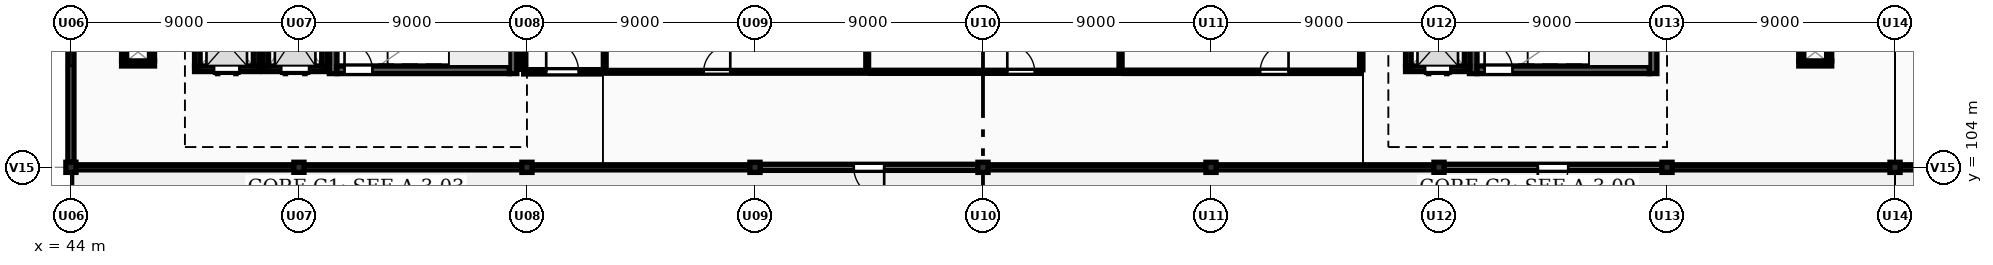
"""IFC4 building model, lengths in metres.
Left out: names, types, materials, properties, quantities, classifications, styles, units other than length and angle.
Written with IfcOpenShell. Run it as: python <this file> out.ifc"""

import sys

from ifc_helpers import new_model, si_unit, direction, frame, frame_2d, origin, origin_2d, place, context, subcontext, project, spatial, rectangle, extrude, element, fill, save


model = new_model("IFC4")
c1 = context("Model", 3, precision=1e-05, world=origin(), true_north=direction((0.0, 1.0)))
c2 = subcontext(c1, "Body", "Model", "MODEL_VIEW")
j1 = project(units=[si_unit("LENGTHUNIT", "METRE"), si_unit("PLANEANGLEUNIT", "RADIAN")], contexts=[c1])
p1 = place(None, origin())
s1 = spatial("IfcSite", under=j1, at=p1, CompositionType="ELEMENT")
p2 = place(p1, origin())
s2 = spatial("IfcBuilding", under=s1, at=p2, CompositionType="ELEMENT")
p3 = place(p2, frame((0.0, 0.0, 8.4)))
s3 = spatial("IfcBuildingStorey", under=s2, at=p3, CompositionType="ELEMENT", Elevation=8.4)
for number, where, z_axis, x_axis in (
    (1, (44.0, 104.0, 0.0), (0.0, 0.0, 1.0), (1.0, 0.0, 0.0)),
    (2, (53.0, 104.0, 0.0), (0.0, 0.0, 1.0), (1.0, 0.0, 0.0)),
    (3, (62.0, 104.0, 0.0), (0.0, 0.0, 1.0), (1.0, 0.0, 0.0)),
    (4, (71.0, 104.0, 0.0), (0.0, 0.0, 1.0), (1.0, 0.0, 0.0)),
    (5, (80.0, 104.0, 0.0), (0.0, 0.0, 1.0), (1.0, 0.0, 0.0)),
    (6, (89.0, 104.0, 0.0), (0.0, 0.0, 1.0), (1.0, 0.0, 0.0)),
    (7, (98.0, 104.0, 0.0), (0.0, 0.0, 1.0), (1.0, 0.0, 0.0)),
    (8, (107.0, 104.0, 0.0), (0.0, 0.0, 1.0), (1.0, 0.0, 0.0)),
    (9, (116.0, 104.0, 0.0), (0.0, 0.0, 1.0), (1.0, 0.0, 0.0)),
):
    element("IfcColumn", number, at=place(p3, frame(where, z_axis=z_axis, x_axis=x_axis)), inside=s3, PredefinedType="COLUMN", context=c2, shape_type="SweptSolid", body=[
        extrude(rectangle(XDim=0.4, YDim=0.4, at=origin_2d()), origin(), (0.0, 0.0, 1.0), 3.9),
    ])
p4 = place(p3, frame((115.8, 104.0, 0.0), z_axis=(0.0, 0.0, 1.0), x_axis=(-1.0, 0.0, 0.0)))
e10 = element("IfcWall", 10, at=p4, inside=s3, PredefinedType="SOLIDWALL", context=c2, shape_type="SweptSolid", body=[
    extrude(rectangle(XDim=8.6, YDim=0.2, at=frame_2d((4.3, 0.0))), origin(), (0.0, 0.0, 1.0), 0.95),
])
p5 = place(p3, frame((106.8, 104.0, 0.0), z_axis=(0.0, 0.0, 1.0), x_axis=(-1.0, 0.0, 0.0)))
e11 = element("IfcWall", 11, at=p5, inside=s3, PredefinedType="SOLIDWALL", context=c2, shape_type="SweptSolid", body=[
    extrude(rectangle(XDim=8.6, YDim=0.24, at=frame_2d((4.3, 0.0))), origin(), (0.0, 0.0, 1.0), 3.008),
])
p6 = place(p5, frame((3.7, 0.0, 0.0)))
e12 = element("IfcOpeningElement", 12, at=p6, cuts=e11, PredefinedType="OPENING", context=c2, shape_type="SweptSolid", body=[
    extrude(rectangle(XDim=1.2, YDim=2.15, at=frame_2d((0.6, 1.075))), frame((0.0, 0.13, 0.0), z_axis=(0.0, -1.0, 0.0), x_axis=(1.0, 0.0, 0.0)), (0.0, 0.0, 1.0), 0.26),
])
for number, where, z_axis, x_axis in (
    (13, (97.8, 104.0, 0.0), (0.0, 0.0, 1.0), (-1.0, 0.0, 0.0)),
    (14, (88.8, 104.0, 0.0), (0.0, 0.0, 1.0), (-1.0, 0.0, 0.0)),
):
    element("IfcWall", number, at=place(p3, frame(where, z_axis=z_axis, x_axis=x_axis)), inside=s3, PredefinedType="SOLIDWALL", context=c2, shape_type="SweptSolid", body=[
        extrude(rectangle(XDim=8.6, YDim=0.2, at=frame_2d((4.3, 0.0))), origin(), (0.0, 0.0, 1.0), 0.95),
    ])
p7 = place(p3, frame((79.8, 104.0, 0.0), z_axis=(0.0, 0.0, 1.0), x_axis=(-1.0, 0.0, 0.0)))
e15 = element("IfcWall", 15, at=p7, inside=s3, PredefinedType="SOLIDWALL", context=c2, shape_type="SweptSolid", body=[
    extrude(rectangle(XDim=8.6, YDim=0.24, at=frame_2d((4.3, 0.0))), origin(), (0.0, 0.0, 1.0), 3.008),
])
p8 = place(p7, frame((3.7, 0.0, 0.0)))
e16 = element("IfcOpeningElement", 16, at=p8, cuts=e15, PredefinedType="OPENING", context=c2, shape_type="SweptSolid", body=[
    extrude(rectangle(XDim=1.2, YDim=2.15, at=frame_2d((0.6, 1.075))), frame((0.0, 0.13, 0.0), z_axis=(0.0, -1.0, 0.0), x_axis=(1.0, 0.0, 0.0)), (0.0, 0.0, 1.0), 0.26),
])
for number, where, z_axis, x_axis in (
    (17, (70.8, 104.0, 0.0), (0.0, 0.0, 1.0), (-1.0, 0.0, 0.0)),
    (18, (61.8, 104.0, 0.0), (0.0, 0.0, 1.0), (-1.0, 0.0, 0.0)),
    (19, (52.8, 104.0, 0.0), (0.0, 0.0, 1.0), (-1.0, 0.0, 0.0)),
):
    element("IfcWall", number, at=place(p3, frame(where, z_axis=z_axis, x_axis=x_axis)), inside=s3, PredefinedType="SOLIDWALL", context=c2, shape_type="SweptSolid", body=[
        extrude(rectangle(XDim=8.6, YDim=0.2, at=frame_2d((4.3, 0.0))), origin(), (0.0, 0.0, 1.0), 0.95),
    ])
p9 = place(p3, frame((44.0, 104.2, 0.0), z_axis=(0.0, 0.0, 1.0), x_axis=(0.0, 1.0, 0.0)))
e20 = element("IfcWall", 20, at=p9, inside=s3, PredefinedType="SOLIDWALL", context=c2, shape_type="SweptSolid", body=[
    extrude(rectangle(XDim=7.6, YDim=0.24, at=frame_2d((3.8, 0.0))), origin(), (0.0, 0.0, 1.0), 3.29),
])
p10 = place(p9, frame((3.8, 0.0, 0.95)))
e21 = element("IfcOpeningElement", 21, at=p10, cuts=e20, PredefinedType="OPENING", context=c2, shape_type="SweptSolid", body=[
    extrude(rectangle(XDim=1.8, YDim=1.5, at=frame_2d((0.9, 0.75))), frame((0.0, 0.13, 0.0), z_axis=(0.0, -1.0, 0.0), x_axis=(1.0, 0.0, 0.0)), (0.0, 0.0, 1.0), 0.26),
])
p11 = place(p3, frame((126.8, 104.0, 0.0), z_axis=(0.0, 0.0, 1.0), x_axis=(-1.0, 0.0, 0.0)))
e22 = element("IfcWall", 22, at=p11, inside=s3, PredefinedType="SOLIDWALL", context=c2, shape_type="SweptSolid", body=[
    extrude(rectangle(XDim=10.6, YDim=0.2, at=frame_2d((5.3, 0.0))), origin(), (0.0, 0.0, 1.0), 0.95),
])
for number, where, z_axis, x_axis in (
    (23, (54.35, 107.7, 0.0), (0.0, 0.0, 1.0), (0.0, 1.0, 0.0)),
    (24, (61.45, 111.8, 0.0), (0.0, 0.0, 1.0), (0.0, -1.0, 0.0)),
):
    element("IfcWall", number, at=place(p3, frame(where, z_axis=z_axis, x_axis=x_axis)), inside=s3, PredefinedType="SHEAR", context=c2, shape_type="SweptSolid", body=[
        extrude(rectangle(XDim=4.1, YDim=0.3, at=frame_2d((2.05, 0.0))), origin(), (0.0, 0.0, 1.0), 3.65),
    ])
p12 = place(p3, frame((54.5, 107.85, 0.0), z_axis=(0.0, 0.0, 1.0), x_axis=(1.0, 0.0, 0.0)))
e25 = element("IfcWall", 25, at=p12, inside=s3, PredefinedType="SHEAR", context=c2, shape_type="SweptSolid", body=[
    extrude(rectangle(XDim=6.8, YDim=0.3, at=frame_2d((3.4, 0.0))), origin(), (0.0, 0.0, 1.0), 3.65),
])
p13 = place(p12, frame((0.3, 0.0, 0.0)))
e26 = element("IfcOpeningElement", 26, at=p13, cuts=e25, PredefinedType="OPENING", context=c2, shape_type="SweptSolid", body=[
    extrude(rectangle(XDim=1.1, YDim=2.15, at=frame_2d((0.55, 1.075))), frame((0.0, 0.16, 0.0), z_axis=(0.0, -1.0, 0.0), x_axis=(1.0, 0.0, 0.0)), (0.0, 0.0, 1.0), 0.32),
])
p14 = place(p3, frame((54.12, 107.89, 0.0), z_axis=(0.0, 0.0, 1.0), x_axis=(-1.0, 0.0, 0.0)))
e27 = element("IfcWall", 27, at=p14, inside=s3, PredefinedType="SHEAR", context=c2, shape_type="SweptSolid", body=[
    extrude(rectangle(XDim=2.54, YDim=0.22, at=frame_2d((1.27, 0.0))), origin(), (0.0, 0.0, 1.0), 3.65),
])
p15 = place(p14, frame((0.72, 0.0, 0.0)))
e28 = element("IfcOpeningElement", 28, at=p15, cuts=e27, PredefinedType="OPENING", context=c2, shape_type="SweptSolid", body=[
    extrude(rectangle(XDim=1.1, YDim=2.15, at=frame_2d((0.55, 1.075))), frame((0.0, 0.12, 0.0), z_axis=(0.0, -1.0, 0.0), x_axis=(1.0, 0.0, 0.0)), (0.0, 0.0, 1.0), 0.24),
])
for number, where, z_axis, x_axis in (
    (29, (51.69, 108.0, 0.0), (0.0, 0.0, 1.0), (0.0, 1.0, 0.0)),
    (30, (54.01, 110.9, 0.0), (0.0, 0.0, 1.0), (0.0, -1.0, 0.0)),
):
    element("IfcWall", number, at=place(p3, frame(where, z_axis=z_axis, x_axis=x_axis)), inside=s3, PredefinedType="SHEAR", context=c2, shape_type="SweptSolid", body=[
        extrude(rectangle(XDim=2.9, YDim=0.22, at=frame_2d((1.45, 0.0))), origin(), (0.0, 0.0, 1.0), 3.65),
    ])
p16 = place(p3, frame((51.42, 107.89, 0.0), z_axis=(0.0, 0.0, 1.0), x_axis=(-1.0, 0.0, 0.0)))
e31 = element("IfcWall", 31, at=p16, inside=s3, PredefinedType="SHEAR", context=c2, shape_type="SweptSolid", body=[
    extrude(rectangle(XDim=2.54, YDim=0.22, at=frame_2d((1.27, 0.0))), origin(), (0.0, 0.0, 1.0), 3.65),
])
p17 = place(p16, frame((0.77, 0.0, 0.0)))
e32 = element("IfcOpeningElement", 32, at=p17, cuts=e31, PredefinedType="OPENING", context=c2, shape_type="SweptSolid", body=[
    extrude(rectangle(XDim=1.0, YDim=2.15, at=frame_2d((0.5, 1.075))), frame((0.0, 0.12, 0.0), z_axis=(0.0, -1.0, 0.0), x_axis=(1.0, 0.0, 0.0)), (0.0, 0.0, 1.0), 0.24),
])
for number, where, z_axis, x_axis in (
    (33, (48.99, 108.0, 0.0), (0.0, 0.0, 1.0), (0.0, 1.0, 0.0)),
    (34, (51.31, 110.3, 0.0), (0.0, 0.0, 1.0), (0.0, -1.0, 0.0)),
):
    element("IfcWall", number, at=place(p3, frame(where, z_axis=z_axis, x_axis=x_axis)), inside=s3, PredefinedType="SHEAR", context=c2, shape_type="SweptSolid", body=[
        extrude(rectangle(XDim=2.3, YDim=0.22, at=frame_2d((1.15, 0.0))), origin(), (0.0, 0.0, 1.0), 3.65),
    ])
for number, where, z_axis, x_axis in (
    (35, (99.35, 107.7, 0.0), (0.0, 0.0, 1.0), (0.0, 1.0, 0.0)),
    (36, (106.45, 111.8, 0.0), (0.0, 0.0, 1.0), (0.0, -1.0, 0.0)),
):
    element("IfcWall", number, at=place(p3, frame(where, z_axis=z_axis, x_axis=x_axis)), inside=s3, PredefinedType="SHEAR", context=c2, shape_type="SweptSolid", body=[
        extrude(rectangle(XDim=4.1, YDim=0.3, at=frame_2d((2.05, 0.0))), origin(), (0.0, 0.0, 1.0), 3.65),
    ])
p18 = place(p3, frame((99.5, 107.85, 0.0), z_axis=(0.0, 0.0, 1.0), x_axis=(1.0, 0.0, 0.0)))
e37 = element("IfcWall", 37, at=p18, inside=s3, PredefinedType="SHEAR", context=c2, shape_type="SweptSolid", body=[
    extrude(rectangle(XDim=6.8, YDim=0.3, at=frame_2d((3.4, 0.0))), origin(), (0.0, 0.0, 1.0), 3.65),
])
p19 = place(p18, frame((0.3, 0.0, 0.0)))
e38 = element("IfcOpeningElement", 38, at=p19, cuts=e37, PredefinedType="OPENING", context=c2, shape_type="SweptSolid", body=[
    extrude(rectangle(XDim=1.1, YDim=2.15, at=frame_2d((0.55, 1.075))), frame((0.0, 0.16, 0.0), z_axis=(0.0, -1.0, 0.0), x_axis=(1.0, 0.0, 0.0)), (0.0, 0.0, 1.0), 0.32),
])
p20 = place(p3, frame((99.22, 107.89, 0.0), z_axis=(0.0, 0.0, 1.0), x_axis=(-1.0, 0.0, 0.0)))
e39 = element("IfcWall", 39, at=p20, inside=s3, PredefinedType="SHEAR", context=c2, shape_type="SweptSolid", body=[
    extrude(rectangle(XDim=2.54, YDim=0.22, at=frame_2d((1.27, 0.0))), origin(), (0.0, 0.0, 1.0), 3.65),
])
p21 = place(p20, frame((0.77, 0.0, 0.0)))
e40 = element("IfcOpeningElement", 40, at=p21, cuts=e39, PredefinedType="OPENING", context=c2, shape_type="SweptSolid", body=[
    extrude(rectangle(XDim=1.0, YDim=2.15, at=frame_2d((0.5, 1.075))), frame((0.0, 0.12, 0.0), z_axis=(0.0, -1.0, 0.0), x_axis=(1.0, 0.0, 0.0)), (0.0, 0.0, 1.0), 0.24),
])
for number, where, z_axis, x_axis in (
    (41, (96.79, 108.0, 0.0), (0.0, 0.0, 1.0), (0.0, 1.0, 0.0)),
    (42, (99.11, 110.3, 0.0), (0.0, 0.0, 1.0), (0.0, -1.0, 0.0)),
):
    element("IfcWall", number, at=place(p3, frame(where, z_axis=z_axis, x_axis=x_axis)), inside=s3, PredefinedType="SHEAR", context=c2, shape_type="SweptSolid", body=[
        extrude(rectangle(XDim=2.3, YDim=0.22, at=frame_2d((1.15, 0.0))), origin(), (0.0, 0.0, 1.0), 3.65),
    ])
p22 = place(p3, frame((47.3, 108.1, 0.0), z_axis=(0.0, 0.0, 1.0), x_axis=(-1.0, 0.0, 0.0)))
e43 = element("IfcWall", 43, at=p22, inside=s3, PredefinedType="PARTITIONING", context=c2, shape_type="SweptSolid", body=[
    extrude(rectangle(XDim=1.3, YDim=0.2, at=frame_2d((0.65, 0.0))), origin(), (0.0, 0.0, 1.0), 3.65),
])
p23 = place(p3, frame((46.1, 108.2, 0.0), z_axis=(0.0, 0.0, 1.0), x_axis=(0.0, 1.0, 0.0)))
e44 = element("IfcWall", 44, at=p23, inside=s3, PredefinedType="PARTITIONING", context=c2, shape_type="SweptSolid", body=[
    extrude(rectangle(XDim=0.7, YDim=0.2, at=frame_2d((0.35, 0.0))), origin(), (0.0, 0.0, 1.0), 3.65),
])
p24 = place(p3, frame((47.2, 108.9, 0.0), z_axis=(0.0, 0.0, 1.0), x_axis=(0.0, -1.0, 0.0)))
e45 = element("IfcWall", 45, at=p24, inside=s3, PredefinedType="PARTITIONING", context=c2, shape_type="SweptSolid", body=[
    extrude(rectangle(XDim=0.7, YDim=0.2, at=frame_2d((0.35, 0.0))), origin(), (0.0, 0.0, 1.0), 3.248),
])
p25 = place(p3, frame((113.5, 108.1, 0.0), z_axis=(0.0, 0.0, 1.0), x_axis=(-1.0, 0.0, 0.0)))
e46 = element("IfcWall", 46, at=p25, inside=s3, PredefinedType="PARTITIONING", context=c2, shape_type="SweptSolid", body=[
    extrude(rectangle(XDim=1.3, YDim=0.2, at=frame_2d((0.65, 0.0))), origin(), (0.0, 0.0, 1.0), 3.65),
])
for number, where, z_axis, x_axis in (
    (47, (112.3, 108.2, 0.0), (0.0, 0.0, 1.0), (0.0, 1.0, 0.0)),
    (48, (113.4, 108.9, 0.0), (0.0, 0.0, 1.0), (0.0, -1.0, 0.0)),
):
    element("IfcWall", number, at=place(p3, frame(where, z_axis=z_axis, x_axis=x_axis)), inside=s3, PredefinedType="PARTITIONING", context=c2, shape_type="SweptSolid", body=[
        extrude(rectangle(XDim=0.7, YDim=0.2, at=frame_2d((0.35, 0.0))), origin(), (0.0, 0.0, 1.0), 3.65),
    ])
p26 = place(p3, frame((65.07, 107.77, 0.0), z_axis=(0.0, 0.0, 1.0), x_axis=(1.0, 0.0, 0.0)))
e49 = element("IfcWall", 49, at=p26, inside=s3, PredefinedType="PARTITIONING", context=c2, shape_type="SweptSolid", body=[
    extrude(rectangle(XDim=10.36, YDim=0.11, at=frame_2d((5.18, 0.0))), origin(), (0.0, 0.0, 1.0), 3.65),
])
p27 = place(p26, frame((3.905, 0.0, 0.0)))
e50 = element("IfcOpeningElement", 50, at=p27, cuts=e49, PredefinedType="OPENING", context=c2, shape_type="SweptSolid", body=[
    extrude(rectangle(XDim=1.05, YDim=2.1, at=frame_2d((0.525, 1.05))), frame((0.0, 0.065, 0.0), z_axis=(0.0, -1.0, 0.0), x_axis=(1.0, 0.0, 0.0)), (0.0, 0.0, 1.0), 0.13),
])
for number, where, z_axis, x_axis in (
    (51, (65.07, 107.84, 0.0), (0.0, 0.0, 1.0), (0.0, 1.0, 0.0)),
    (52, (75.43, 107.84, 0.0), (0.0, 0.0, 1.0), (0.0, 1.0, 0.0)),
):
    element("IfcWall", number, at=place(p3, frame(where, z_axis=z_axis, x_axis=x_axis)), inside=s3, PredefinedType="PARTITIONING", context=c2, shape_type="SweptSolid", body=[
        extrude(rectangle(XDim=4.16, YDim=0.11, at=frame_2d((2.08, 0.0))), origin(), (0.0, 0.0, 1.0), 3.65),
    ])
p28 = place(p3, frame((75.57, 107.77, 0.0), z_axis=(0.0, 0.0, 1.0), x_axis=(1.0, 0.0, 0.0)))
e53 = element("IfcWall", 53, at=p28, inside=s3, PredefinedType="PARTITIONING", context=c2, shape_type="SweptSolid", body=[
    extrude(rectangle(XDim=9.86, YDim=0.12, at=frame_2d((4.93, 0.0))), origin(), (0.0, 0.0, 1.0), 3.65),
])
p29 = place(p28, frame((5.39, 0.0, 0.0)))
e54 = element("IfcOpeningElement", 54, at=p29, cuts=e53, PredefinedType="OPENING", context=c2, shape_type="SweptSolid", body=[
    extrude(rectangle(XDim=1.08, YDim=2.15, at=frame_2d((0.54, 1.075))), frame((0.0, 0.07, 0.0), z_axis=(0.0, -1.0, 0.0), x_axis=(1.0, 0.0, 0.0)), (0.0, 0.0, 1.0), 0.14),
])
p30 = place(p3, frame((85.43, 107.845, 0.0), z_axis=(0.0, 0.0, 1.0), x_axis=(0.0, 1.0, 0.0)))
e55 = element("IfcWall", 55, at=p30, inside=s3, PredefinedType="PARTITIONING", context=c2, shape_type="SweptSolid", body=[
    extrude(rectangle(XDim=4.155, YDim=0.12, at=frame_2d((2.078, 0.0))), origin(), (0.0, 0.0, 1.0), 3.65),
])
p31 = place(p3, frame((85.57, 107.77, 0.0), z_axis=(0.0, 0.0, 1.0), x_axis=(1.0, 0.0, 0.0)))
e56 = element("IfcWall", 56, at=p31, inside=s3, PredefinedType="PARTITIONING", context=c2, shape_type="SweptSolid", body=[
    extrude(rectangle(XDim=9.36, YDim=0.13, at=frame_2d((4.68, 0.0))), origin(), (0.0, 0.0, 1.0), 3.65),
])
p32 = place(p31, frame((5.37, 0.0, 0.0)))
e57 = element("IfcOpeningElement", 57, at=p32, cuts=e56, PredefinedType="OPENING", context=c2, shape_type="SweptSolid", body=[
    extrude(rectangle(XDim=1.12, YDim=2.15, at=frame_2d((0.56, 1.075))), frame((0.0, 0.075, 0.0), z_axis=(0.0, -1.0, 0.0), x_axis=(1.0, 0.0, 0.0)), (0.0, 0.0, 1.0), 0.15),
])
p33 = place(p3, frame((94.93, 107.85, 0.0), z_axis=(0.0, 0.0, 1.0), x_axis=(0.0, 1.0, 0.0)))
e58 = element("IfcWall", 58, at=p33, inside=s3, PredefinedType="PARTITIONING", context=c2, shape_type="SweptSolid", body=[
    extrude(rectangle(XDim=4.15, YDim=0.13, at=frame_2d((2.075, 0.0))), origin(), (0.0, 0.0, 1.0), 3.248),
])
p34 = place(p3, frame((61.87, 107.77, 0.0), z_axis=(0.0, 0.0, 1.0), x_axis=(1.0, 0.0, 0.0)))
e59 = element("IfcWall", 59, at=p34, inside=s3, PredefinedType="PARTITIONING", context=c2, shape_type="SweptSolid", body=[
    extrude(rectangle(XDim=3.06, YDim=0.17, at=frame_2d((1.53, 0.0))), origin(), (0.0, 0.0, 1.0), 3.65),
])
p35 = place(p34, frame((0.89, 0.0, 0.0)))
e60 = element("IfcOpeningElement", 60, at=p35, cuts=e59, PredefinedType="OPENING", context=c2, shape_type="SweptSolid", body=[
    extrude(rectangle(XDim=1.28, YDim=2.15, at=frame_2d((0.64, 1.075))), frame((0.0, 0.095, 0.0), z_axis=(0.0, -1.0, 0.0), x_axis=(1.0, 0.0, 0.0)), (0.0, 0.0, 1.0), 0.19),
])
p36 = place(p3, frame((61.87, 107.87, 0.0), z_axis=(0.0, 0.0, 1.0), x_axis=(0.0, 1.0, 0.0)))
e61 = element("IfcWall", 61, at=p36, inside=s3, PredefinedType="PARTITIONING", context=c2, shape_type="SweptSolid", body=[
    extrude(rectangle(XDim=3.915, YDim=0.17, at=frame_2d((1.958, 0.0))), origin(), (0.0, 0.0, 1.0), 3.65),
])
p37 = place(p6, origin())
e62 = element("IfcDoor", 62, at=p37, inside=s3, OperationType="SINGLE_SWING_RIGHT", PredefinedType="DOOR", context=c2, shape_type="SweptSolid", body=[
    extrude(rectangle(XDim=1.2, YDim=2.15, at=frame_2d((0.6, 1.075))), frame((0.0, 0.025, 0.0), z_axis=(0.0, -1.0, 0.0), x_axis=(1.0, 0.0, 0.0)), (0.0, 0.0, 1.0), 0.05),
])
fill(e12, e62)
p38 = place(p8, origin())
e63 = element("IfcDoor", 63, at=p38, inside=s3, OperationType="SINGLE_SWING_LEFT", PredefinedType="DOOR", context=c2, shape_type="SweptSolid", body=[
    extrude(rectangle(XDim=1.2, YDim=2.15, at=frame_2d((0.6, 1.075))), frame((0.0, 0.025, 0.0), z_axis=(0.0, -1.0, 0.0), x_axis=(1.0, 0.0, 0.0)), (0.0, 0.0, 1.0), 0.05),
])
fill(e16, e63)
p39 = place(p10, origin())
e64 = element("IfcWindow", 64, at=p39, inside=s3, PartitioningType="DOUBLE_PANEL_VERTICAL", PredefinedType="WINDOW", context=c2, shape_type="SweptSolid", body=[
    extrude(rectangle(XDim=1.8, YDim=1.5, at=frame_2d((0.9, 0.75))), frame((0.0, 0.03, 0.0), z_axis=(0.0, -1.0, 0.0), x_axis=(1.0, 0.0, 0.0)), (0.0, 0.0, 1.0), 0.06),
])
fill(e21, e64)
p40 = place(p13, origin())
e65 = element("IfcDoor", 65, at=p40, inside=s3, OperationType="SINGLE_SWING_LEFT", PredefinedType="DOOR", context=c2, shape_type="SweptSolid", body=[
    extrude(rectangle(XDim=1.1, YDim=2.15, at=frame_2d((0.55, 1.075))), frame((0.0, 0.025, 0.0), z_axis=(0.0, -1.0, 0.0), x_axis=(1.0, 0.0, 0.0)), (0.0, 0.0, 1.0), 0.05),
])
fill(e26, e65)
p41 = place(p15, origin())
e66 = element("IfcDoor", 66, at=p41, inside=s3, OperationType="DOUBLE_DOOR_SLIDING", PredefinedType="DOOR", context=c2, shape_type="SweptSolid", body=[
    extrude(rectangle(XDim=1.1, YDim=2.15, at=frame_2d((0.55, 1.075))), frame((0.0, 0.025, 0.0), z_axis=(0.0, -1.0, 0.0), x_axis=(1.0, 0.0, 0.0)), (0.0, 0.0, 1.0), 0.05),
])
fill(e28, e66)
p42 = place(p17, origin())
e67 = element("IfcDoor", 67, at=p42, inside=s3, OperationType="DOUBLE_DOOR_SLIDING", PredefinedType="DOOR", context=c2, shape_type="SweptSolid", body=[
    extrude(rectangle(XDim=1.0, YDim=2.15, at=frame_2d((0.5, 1.075))), frame((0.0, 0.025, 0.0), z_axis=(0.0, -1.0, 0.0), x_axis=(1.0, 0.0, 0.0)), (0.0, 0.0, 1.0), 0.05),
])
fill(e32, e67)
p43 = place(p19, origin())
e68 = element("IfcDoor", 68, at=p43, inside=s3, OperationType="SINGLE_SWING_LEFT", PredefinedType="DOOR", context=c2, shape_type="SweptSolid", body=[
    extrude(rectangle(XDim=1.1, YDim=2.15, at=frame_2d((0.55, 1.075))), frame((0.0, 0.025, 0.0), z_axis=(0.0, -1.0, 0.0), x_axis=(1.0, 0.0, 0.0)), (0.0, 0.0, 1.0), 0.05),
])
fill(e38, e68)
p44 = place(p21, origin())
e69 = element("IfcDoor", 69, at=p44, inside=s3, OperationType="DOUBLE_DOOR_SLIDING", PredefinedType="DOOR", context=c2, shape_type="SweptSolid", body=[
    extrude(rectangle(XDim=1.0, YDim=2.15, at=frame_2d((0.5, 1.075))), frame((0.0, 0.025, 0.0), z_axis=(0.0, -1.0, 0.0), x_axis=(1.0, 0.0, 0.0)), (0.0, 0.0, 1.0), 0.05),
])
fill(e40, e69)
p45 = place(p27, origin())
e70 = element("IfcDoor", 70, at=p45, inside=s3, OperationType="SINGLE_SWING_RIGHT", PredefinedType="DOOR", context=c2, shape_type="SweptSolid", body=[
    extrude(rectangle(XDim=1.05, YDim=2.1, at=frame_2d((0.525, 1.05))), frame((0.0, 0.025, 0.0), z_axis=(0.0, -1.0, 0.0), x_axis=(1.0, 0.0, 0.0)), (0.0, 0.0, 1.0), 0.05),
])
fill(e50, e70)
p46 = place(p29, origin())
e71 = element("IfcDoor", 71, at=p46, inside=s3, OperationType="SINGLE_SWING_LEFT", PredefinedType="DOOR", context=c2, shape_type="SweptSolid", body=[
    extrude(rectangle(XDim=1.08, YDim=2.15, at=frame_2d((0.54, 1.075))), frame((0.0, 0.025, 0.0), z_axis=(0.0, -1.0, 0.0), x_axis=(1.0, 0.0, 0.0)), (0.0, 0.0, 1.0), 0.05),
])
fill(e54, e71)
p47 = place(p32, origin())
e72 = element("IfcDoor", 72, at=p47, inside=s3, OperationType="SINGLE_SWING_RIGHT", PredefinedType="DOOR", context=c2, shape_type="SweptSolid", body=[
    extrude(rectangle(XDim=1.12, YDim=2.15, at=frame_2d((0.56, 1.075))), frame((0.0, 0.025, 0.0), z_axis=(0.0, -1.0, 0.0), x_axis=(1.0, 0.0, 0.0)), (0.0, 0.0, 1.0), 0.05),
])
fill(e57, e72)
p48 = place(p35, origin())
e73 = element("IfcDoor", 73, at=p48, inside=s3, OperationType="SINGLE_SWING_LEFT", PredefinedType="DOOR", context=c2, shape_type="SweptSolid", body=[
    extrude(rectangle(XDim=1.28, YDim=2.15, at=frame_2d((0.64, 1.075))), frame((0.0, 0.025, 0.0), z_axis=(0.0, -1.0, 0.0), x_axis=(1.0, 0.0, 0.0)), (0.0, 0.0, 1.0), 0.05),
])
fill(e60, e73)
save(model, sys.argv[1])
